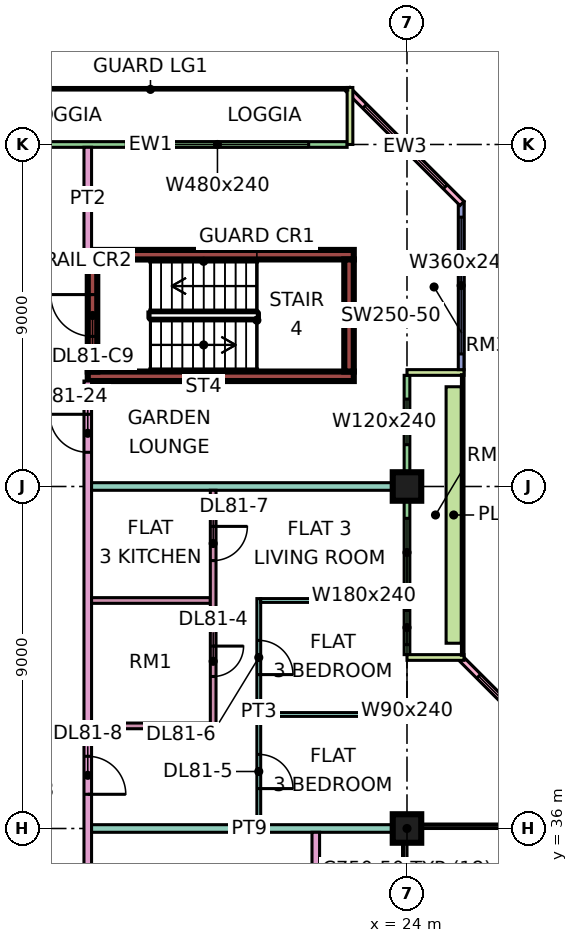
"""IFC4 building model, lengths in metres.
Left out: names, types, materials, properties, quantities, classifications, styles, units other than length and angle.
Written with IfcOpenShell. Run it as: python <this file> out.ifc"""

import sys

from ifc_helpers import new_model, si_unit, direction, frame, frame_2d, origin, origin_2d, place, context, subcontext, project, spatial, rectangle, extrude, element, fill, save


model = new_model("IFC4")
c1 = context("Model", 3, precision=1e-05, world=origin(), true_north=direction((0.0, 1.0)))
c2 = subcontext(c1, "Body", "Model", "MODEL_VIEW")
j1 = project(units=[si_unit("LENGTHUNIT", "METRE"), si_unit("PLANEANGLEUNIT", "RADIAN")], contexts=[c1])
p1 = place(None, origin())
s1 = spatial("IfcSite", under=j1, at=p1, CompositionType="ELEMENT")
p2 = place(p1, origin())
s2 = spatial("IfcBuilding", under=s1, at=p2, CompositionType="ELEMENT")
p3 = place(p2, frame((0.0, 0.0, 350.15)))
s3 = spatial("IfcBuildingStorey", under=s2, at=p3, CompositionType="ELEMENT", Elevation=350.15)
for number, where, z_axis, x_axis in (
    (1, (24.0, 36.0, 0.0), (0.0, 0.0, 1.0), (1.0, 0.0, 0.0)),
    (2, (24.0, 45.0, 0.0), (0.0, 0.0, 1.0), (1.0, 0.0, 0.0)),
):
    element("IfcColumn", number, at=place(p3, frame(where, z_axis=z_axis, x_axis=x_axis)), inside=s3, PredefinedType="COLUMN", context=c2, shape_type="SweptSolid", body=[
        extrude(rectangle(XDim=0.75, YDim=0.75, at=origin_2d()), origin(), (0.0, 0.0, 1.0), 3.75),
    ])
for number, where, z_axis, x_axis in (
    (3, (15.6, 47.9, 0.0), (0.0, 0.0, 1.0), (1.0, 0.0, 0.0)),
    (4, (15.6, 51.1, 0.0), (0.0, 0.0, 1.0), (1.0, 0.0, 0.0)),
):
    element("IfcWall", number, at=place(p3, frame(where, z_axis=z_axis, x_axis=x_axis)), inside=s3, PredefinedType="SHEAR", context=c2, shape_type="SweptSolid", body=[
        extrude(rectangle(XDim=7.0, YDim=0.25, at=frame_2d((3.5, 0.0))), origin(), (0.0, 0.0, 1.0), 3.75),
    ])
p4 = place(p3, frame((15.725, 48.025, 0.0), z_axis=(0.0, 0.0, 1.0), x_axis=(0.0, 1.0, 0.0)))
e5 = element("IfcWall", 5, at=p4, inside=s3, PredefinedType="SHEAR", context=c2, shape_type="SweptSolid", body=[
    extrude(rectangle(XDim=2.95, YDim=0.25, at=frame_2d((1.475, 0.0))), origin(), (0.0, 0.0, 1.0), 3.75),
])
p5 = place(p4, frame((0.925, 0.0, 0.0)))
e6 = element("IfcOpeningElement", 6, at=p5, cuts=e5, PredefinedType="OPENING", context=c2, shape_type="SweptSolid", body=[
    extrude(rectangle(XDim=1.1, YDim=2.2, at=frame_2d((0.55, 1.1))), frame((0.0, 0.135, 0.0), z_axis=(0.0, -1.0, 0.0), x_axis=(1.0, 0.0, 0.0)), (0.0, 0.0, 1.0), 0.27),
])
p6 = place(p3, frame((22.475, 48.025, 0.0), z_axis=(0.0, 0.0, 1.0), x_axis=(0.0, 1.0, 0.0)))
e7 = element("IfcWall", 7, at=p6, inside=s3, PredefinedType="SHEAR", context=c2, shape_type="SweptSolid", body=[
    extrude(rectangle(XDim=2.95, YDim=0.25, at=frame_2d((1.475, 0.0))), origin(), (0.0, 0.0, 1.0), 3.75),
])
p7 = place(p3, frame((28.447, 37.447, 0.0), z_axis=(0.0, 0.0, 1.0), x_axis=(-0.707106781187, 0.707106781187, 0.0)))
e8 = element("IfcWall", 8, at=p7, inside=s3, PredefinedType="SOLIDWALL", context=c2, shape_type="SweptSolid", body=[
    extrude(rectangle(XDim=4.243, YDim=0.15, at=frame_2d((2.121, 0.0))), origin(), (0.0, 0.0, 1.0), 3.35),
])
p8 = place(p7, frame((0.621, 0.0, 0.45)))
e9 = element("IfcOpeningElement", 9, at=p8, cuts=e8, PredefinedType="OPENING", context=c2, shape_type="SweptSolid", body=[
    extrude(rectangle(XDim=3.0, YDim=2.4, at=frame_2d((1.5, 1.2))), frame((0.0, 0.085, 0.0), z_axis=(0.0, -1.0, 0.0), x_axis=(1.0, 0.0, 0.0)), (0.0, 0.0, 1.0), 0.17),
])
p9 = place(p3, frame((24.0, 40.575, 0.0), z_axis=(0.0, 0.0, 1.0), x_axis=(0.0, 1.0, 0.0)))
e10 = element("IfcWall", 10, at=p9, inside=s3, PredefinedType="SOLIDWALL", context=c2, shape_type="SweptSolid", body=[
    extrude(rectangle(XDim=7.35, YDim=0.15, at=frame_2d((3.675, 0.0))), origin(), (0.0, 0.0, 1.0), 3.35),
])
p10 = place(p9, frame((0.262, 0.0, 0.45)))
e11 = element("IfcOpeningElement", 11, at=p10, cuts=e10, PredefinedType="OPENING", context=c2, shape_type="SweptSolid", body=[
    extrude(rectangle(XDim=0.9, YDim=2.4, at=frame_2d((0.45, 1.2))), frame((0.0, 0.085, 0.0), z_axis=(0.0, -1.0, 0.0), x_axis=(1.0, 0.0, 0.0)), (0.0, 0.0, 1.0), 0.17),
])
p11 = place(p9, frame((1.788, 0.0, 0.45)))
e12 = element("IfcOpeningElement", 12, at=p11, cuts=e10, PredefinedType="OPENING", context=c2, shape_type="SweptSolid", body=[
    extrude(rectangle(XDim=1.8, YDim=2.4, at=frame_2d((0.9, 1.2))), frame((0.0, 0.085, 0.0), z_axis=(0.0, -1.0, 0.0), x_axis=(1.0, 0.0, 0.0)), (0.0, 0.0, 1.0), 0.17),
])
p12 = place(p9, frame((5.525, 0.0, 0.45)))
e13 = element("IfcOpeningElement", 13, at=p12, cuts=e10, PredefinedType="OPENING", context=c2, shape_type="SweptSolid", body=[
    extrude(rectangle(XDim=1.2, YDim=2.4, at=frame_2d((0.6, 1.2))), frame((0.0, 0.085, 0.0), z_axis=(0.0, -1.0, 0.0), x_axis=(1.0, 0.0, 0.0)), (0.0, 0.0, 1.0), 0.17),
])
for number, where, z_axis, x_axis in (
    (14, (25.5, 40.5, 0.0), (0.0, 0.0, 1.0), (-1.0, 0.0, 0.0)),
    (15, (25.5, 48.0, 0.0), (0.0, 0.0, 1.0), (-1.0, 0.0, 0.0)),
):
    element("IfcWall", number, at=place(p3, frame(where, z_axis=z_axis, x_axis=x_axis)), inside=s3, PredefinedType="SOLIDWALL", context=c2, shape_type="SweptSolid", body=[
        extrude(rectangle(XDim=1.5, YDim=0.15, at=frame_2d((0.75, 0.0))), origin(), (0.0, 0.0, 1.0), 3.35),
    ])
p13 = place(p3, frame((25.425, 48.075, 0.0), z_axis=(0.0, 0.0, 1.0), x_axis=(0.0, 1.0, 0.0)))
e16 = element("IfcWall", 16, at=p13, inside=s3, PredefinedType="SOLIDWALL", context=c2, shape_type="SweptSolid", body=[
    extrude(rectangle(XDim=4.425, YDim=0.15, at=frame_2d((2.212, 0.0))), origin(), (0.0, 0.0, 1.0), 3.35),
])
p14 = place(p13, frame((0.413, 0.0, 0.45)))
e17 = element("IfcOpeningElement", 17, at=p14, cuts=e16, PredefinedType="OPENING", context=c2, shape_type="SweptSolid", body=[
    extrude(rectangle(XDim=3.6, YDim=2.4, at=frame_2d((1.8, 1.2))), frame((0.0, 0.085, 0.0), z_axis=(0.0, -1.0, 0.0), x_axis=(1.0, 0.0, 0.0)), (0.0, 0.0, 1.0), 0.17),
])
p15 = place(p3, frame((25.447, 52.447, 0.0), z_axis=(0.0, 0.0, 1.0), x_axis=(-0.707106781187, 0.707106781187, 0.0)))
e18 = element("IfcWall", 18, at=p15, inside=s3, PredefinedType="SOLIDWALL", context=c2, shape_type="SweptSolid", body=[
    extrude(rectangle(XDim=4.243, YDim=0.15, at=frame_2d((2.121, 0.0))), origin(), (0.0, 0.0, 1.0), 3.35),
])
p16 = place(p15, frame((0.621, 0.0, 0.45)))
e19 = element("IfcOpeningElement", 19, at=p16, cuts=e18, PredefinedType="OPENING", context=c2, shape_type="SweptSolid", body=[
    extrude(rectangle(XDim=3.0, YDim=2.4, at=frame_2d((1.5, 1.2))), frame((0.0, 0.085, 0.0), z_axis=(0.0, -1.0, 0.0), x_axis=(1.0, 0.0, 0.0)), (0.0, 0.0, 1.0), 0.17),
])
p17 = place(p3, frame((22.425, 54.0, 0.0), z_axis=(0.0, 0.0, 1.0), x_axis=(-1.0, 0.0, 0.0)))
e20 = element("IfcWall", 20, at=p17, inside=s3, PredefinedType="SOLIDWALL", context=c2, shape_type="SweptSolid", body=[
    extrude(rectangle(XDim=10.35, YDim=0.15, at=frame_2d((5.175, 0.0))), origin(), (0.0, 0.0, 1.0), 3.35),
])
p18 = place(p17, frame((1.012, 0.0, 0.45)))
e21 = element("IfcOpeningElement", 21, at=p18, cuts=e20, PredefinedType="OPENING", context=c2, shape_type="SweptSolid", body=[
    extrude(rectangle(XDim=4.8, YDim=2.4, at=frame_2d((2.4, 1.2))), frame((0.0, 0.085, 0.0), z_axis=(0.0, -1.0, 0.0), x_axis=(1.0, 0.0, 0.0)), (0.0, 0.0, 1.0), 0.17),
])
p19 = place(p3, frame((22.5, 55.5, 0.0), z_axis=(0.0, 0.0, 1.0), x_axis=(0.0, -1.0, 0.0)))
e22 = element("IfcWall", 22, at=p19, inside=s3, PredefinedType="SOLIDWALL", context=c2, shape_type="SweptSolid", body=[
    extrude(rectangle(XDim=1.5, YDim=0.15, at=frame_2d((0.75, 0.0))), origin(), (0.0, 0.0, 1.0), 3.35),
])
p20 = place(p3, frame((25.229, 40.875, 0.0), z_axis=(0.0, 0.0, 1.0), x_axis=(0.0, 1.0, 0.0)))
e23 = element("IfcWall", 23, at=p20, inside=s3, PredefinedType="SOLIDWALL", context=c2, shape_type="SweptSolid", body=[
    extrude(rectangle(XDim=6.75, YDim=0.4, at=frame_2d((3.375, 0.0))), origin(), (0.0, 0.0, 1.0), 0.7),
])
p21 = place(p3, frame((15.6, 20.0, 0.0), z_axis=(0.0, 0.0, 1.0), x_axis=(0.0, 1.0, 0.0)))
e24 = element("IfcWall", 24, at=p21, inside=s3, PredefinedType="PARTITIONING", context=c2, shape_type="SweptSolid", body=[
    extrude(rectangle(XDim=27.775, YDim=0.2, at=frame_2d((13.887, 0.0))), origin(), (0.0, 0.0, 1.0), 3.35),
])
p22 = place(p21, frame((6.7, 0.0, 0.0)))
e25 = element("IfcOpeningElement", 25, at=p22, cuts=e24, PredefinedType="OPENING", context=c2, shape_type="SweptSolid", body=[
    extrude(rectangle(XDim=1.6, YDim=2.1, at=frame_2d((0.8, 1.05))), frame((0.0, 0.11, 0.0), z_axis=(0.0, -1.0, 0.0), x_axis=(1.0, 0.0, 0.0)), (0.0, 0.0, 1.0), 0.22),
])
p23 = place(p21, frame((12.95, 0.0, 0.0)))
e26 = element("IfcOpeningElement", 26, at=p23, cuts=e24, PredefinedType="OPENING", context=c2, shape_type="SweptSolid", body=[
    extrude(rectangle(XDim=1.0, YDim=2.1, at=frame_2d((0.5, 1.05))), frame((0.0, 0.11, 0.0), z_axis=(0.0, -1.0, 0.0), x_axis=(1.0, 0.0, 0.0)), (0.0, 0.0, 1.0), 0.22),
])
p24 = place(p21, frame((16.9, 0.0, 0.0)))
e27 = element("IfcOpeningElement", 27, at=p24, cuts=e24, PredefinedType="OPENING", context=c2, shape_type="SweptSolid", body=[
    extrude(rectangle(XDim=1.0, YDim=2.1, at=frame_2d((0.5, 1.05))), frame((0.0, 0.11, 0.0), z_axis=(0.0, -1.0, 0.0), x_axis=(1.0, 0.0, 0.0)), (0.0, 0.0, 1.0), 0.22),
])
p25 = place(p21, frame((1.15, 0.0, 0.0)))
e28 = element("IfcOpeningElement", 28, at=p25, cuts=e24, PredefinedType="OPENING", context=c2, shape_type="SweptSolid", body=[
    extrude(rectangle(XDim=1.8, YDim=2.1, at=frame_2d((0.9, 1.05))), frame((0.0, 0.11, 0.0), z_axis=(0.0, -1.0, 0.0), x_axis=(1.0, 0.0, 0.0)), (0.0, 0.0, 1.0), 0.22),
])
p26 = place(p21, frame((25.9, 0.0, 0.0)))
e29 = element("IfcOpeningElement", 29, at=p26, cuts=e24, PredefinedType="OPENING", context=c2, shape_type="SweptSolid", body=[
    extrude(rectangle(XDim=1.0, YDim=2.1, at=frame_2d((0.5, 1.05))), frame((0.0, 0.11, 0.0), z_axis=(0.0, -1.0, 0.0), x_axis=(1.0, 0.0, 0.0)), (0.0, 0.0, 1.0), 0.22),
])
p27 = place(p3, frame((15.6, 51.225, 0.0), z_axis=(0.0, 0.0, 1.0), x_axis=(0.0, 1.0, 0.0)))
e30 = element("IfcWall", 30, at=p27, inside=s3, PredefinedType="PARTITIONING", context=c2, shape_type="SweptSolid", body=[
    extrude(rectangle(XDim=2.701, YDim=0.2, at=frame_2d((1.351, 0.0))), origin(), (0.0, 0.0, 1.0), 3.35),
])
p28 = place(p3, frame((15.7, 36.0, 0.0), z_axis=(0.0, 0.0, 1.0), x_axis=(1.0, 0.0, 0.0)))
e31 = element("IfcWall", 31, at=p28, inside=s3, PredefinedType="PARTITIONING", context=c2, shape_type="SweptSolid", body=[
    extrude(rectangle(XDim=8.3, YDim=0.2, at=frame_2d((4.15, 0.0))), origin(), (0.0, 0.0, 1.0), 3.35),
])
for number, where, z_axis, x_axis in (
    (32, (15.7, 38.7, 0.0), (0.0, 0.0, 1.0), (1.0, 0.0, 0.0)),
    (33, (15.7, 42.0, 0.0), (0.0, 0.0, 1.0), (1.0, 0.0, 0.0)),
):
    element("IfcWall", number, at=place(p3, frame(where, z_axis=z_axis, x_axis=x_axis)), inside=s3, PredefinedType="PARTITIONING", context=c2, shape_type="SweptSolid", body=[
        extrude(rectangle(XDim=3.125, YDim=0.15, at=frame_2d((1.562, 0.0))), origin(), (0.0, 0.0, 1.0), 3.35),
    ])
p29 = place(p3, frame((15.7, 45.0, 0.0), z_axis=(0.0, 0.0, 1.0), x_axis=(1.0, 0.0, 0.0)))
e34 = element("IfcWall", 34, at=p29, inside=s3, PredefinedType="PARTITIONING", context=c2, shape_type="SweptSolid", body=[
    extrude(rectangle(XDim=8.226, YDim=0.2, at=frame_2d((4.113, 0.0))), origin(), (0.0, 0.0, 1.0), 3.35),
])
p30 = place(p3, frame((18.9, 38.625, 0.0), z_axis=(0.0, 0.0, 1.0), x_axis=(0.0, 1.0, 0.0)))
e35 = element("IfcWall", 35, at=p30, inside=s3, PredefinedType="PARTITIONING", context=c2, shape_type="SweptSolid", body=[
    extrude(rectangle(XDim=6.275, YDim=0.15, at=frame_2d((3.137, 0.0))), origin(), (0.0, 0.0, 1.0), 3.35),
])
p31 = place(p30, frame((1.375, 0.0, 0.0)))
e36 = element("IfcOpeningElement", 36, at=p31, cuts=e35, PredefinedType="OPENING", context=c2, shape_type="SweptSolid", body=[
    extrude(rectangle(XDim=0.8, YDim=2.1, at=frame_2d((0.4, 1.05))), frame((0.0, 0.085, 0.0), z_axis=(0.0, -1.0, 0.0), x_axis=(1.0, 0.0, 0.0)), (0.0, 0.0, 1.0), 0.17),
])
p32 = place(p30, frame((4.425, 0.0, 0.0)))
e37 = element("IfcOpeningElement", 37, at=p32, cuts=e35, PredefinedType="OPENING", context=c2, shape_type="SweptSolid", body=[
    extrude(rectangle(XDim=0.9, YDim=2.1, at=frame_2d((0.45, 1.05))), frame((0.0, 0.085, 0.0), z_axis=(0.0, -1.0, 0.0), x_axis=(1.0, 0.0, 0.0)), (0.0, 0.0, 1.0), 0.17),
])
p33 = place(p3, frame((20.1, 36.1, 0.0), z_axis=(0.0, 0.0, 1.0), x_axis=(0.0, 1.0, 0.0)))
e38 = element("IfcWall", 38, at=p33, inside=s3, PredefinedType="PARTITIONING", context=c2, shape_type="SweptSolid", body=[
    extrude(rectangle(XDim=5.95, YDim=0.1, at=frame_2d((2.975, 0.0))), origin(), (0.0, 0.0, 1.0), 3.35),
])
p34 = place(p33, frame((0.95, 0.0, 0.0)))
e39 = element("IfcOpeningElement", 39, at=p34, cuts=e38, PredefinedType="OPENING", context=c2, shape_type="SweptSolid", body=[
    extrude(rectangle(XDim=0.9, YDim=2.1, at=frame_2d((0.45, 1.05))), frame((0.0, 0.06, 0.0), z_axis=(0.0, -1.0, 0.0), x_axis=(1.0, 0.0, 0.0)), (0.0, 0.0, 1.0), 0.12),
])
p35 = place(p33, frame((3.95, 0.0, 0.0)))
e40 = element("IfcOpeningElement", 40, at=p35, cuts=e38, PredefinedType="OPENING", context=c2, shape_type="SweptSolid", body=[
    extrude(rectangle(XDim=0.9, YDim=2.1, at=frame_2d((0.45, 1.05))), frame((0.0, 0.06, 0.0), z_axis=(0.0, -1.0, 0.0), x_axis=(1.0, 0.0, 0.0)), (0.0, 0.0, 1.0), 0.12),
])
p36 = place(p3, frame((20.15, 39.0, 0.0), z_axis=(0.0, 0.0, 1.0), x_axis=(1.0, 0.0, 0.0)))
e41 = element("IfcWall", 41, at=p36, inside=s3, PredefinedType="PARTITIONING", context=c2, shape_type="SweptSolid", body=[
    extrude(rectangle(XDim=3.85, YDim=0.1, at=frame_2d((1.925, 0.0))), origin(), (0.0, 0.0, 1.0), 3.35),
])
p37 = place(p3, frame((20.15, 42.0, 0.0), z_axis=(0.0, 0.0, 1.0), x_axis=(1.0, 0.0, 0.0)))
e42 = element("IfcWall", 42, at=p37, inside=s3, PredefinedType="PARTITIONING", context=c2, shape_type="SweptSolid", body=[
    extrude(rectangle(XDim=3.776, YDim=0.1, at=frame_2d((1.888, 0.0))), origin(), (0.0, 0.0, 1.0), 3.35),
])
p38 = place(p3, frame((21.6, 23.9, 0.0), z_axis=(0.0, 0.0, 1.0), x_axis=(0.0, 1.0, 0.0)))
e43 = element("IfcWall", 43, at=p38, inside=s3, PredefinedType="PARTITIONING", context=c2, shape_type="SweptSolid", body=[
    extrude(rectangle(XDim=12.0, YDim=0.2, at=frame_2d((6.0, 0.0))), origin(), (0.0, 0.0, 1.0), 3.35),
])
p39 = place(p8, origin())
e44 = element("IfcWindow", 44, at=p39, inside=s3, PartitioningType="SINGLE_PANEL", PredefinedType="WINDOW", context=c2, shape_type="SweptSolid", body=[
    extrude(rectangle(XDim=3.0, YDim=2.4, at=frame_2d((1.5, 1.2))), frame((0.0, 0.03, 0.0), z_axis=(0.0, -1.0, 0.0), x_axis=(1.0, 0.0, 0.0)), (0.0, 0.0, 1.0), 0.06),
])
fill(e9, e44)
p40 = place(p10, origin())
e45 = element("IfcWindow", 45, at=p40, inside=s3, PartitioningType="SINGLE_PANEL", PredefinedType="WINDOW", context=c2, shape_type="SweptSolid", body=[
    extrude(rectangle(XDim=0.9, YDim=2.4, at=frame_2d((0.45, 1.2))), frame((0.0, 0.03, 0.0), z_axis=(0.0, -1.0, 0.0), x_axis=(1.0, 0.0, 0.0)), (0.0, 0.0, 1.0), 0.06),
])
fill(e11, e45)
p41 = place(p11, origin())
e46 = element("IfcWindow", 46, at=p41, inside=s3, PartitioningType="SINGLE_PANEL", PredefinedType="WINDOW", context=c2, shape_type="SweptSolid", body=[
    extrude(rectangle(XDim=1.8, YDim=2.4, at=frame_2d((0.9, 1.2))), frame((0.0, 0.03, 0.0), z_axis=(0.0, -1.0, 0.0), x_axis=(1.0, 0.0, 0.0)), (0.0, 0.0, 1.0), 0.06),
])
fill(e12, e46)
p42 = place(p12, origin())
e47 = element("IfcWindow", 47, at=p42, inside=s3, PartitioningType="SINGLE_PANEL", PredefinedType="WINDOW", context=c2, shape_type="SweptSolid", body=[
    extrude(rectangle(XDim=1.2, YDim=2.4, at=frame_2d((0.6, 1.2))), frame((0.0, 0.03, 0.0), z_axis=(0.0, -1.0, 0.0), x_axis=(1.0, 0.0, 0.0)), (0.0, 0.0, 1.0), 0.06),
])
fill(e13, e47)
p43 = place(p14, origin())
e48 = element("IfcWindow", 48, at=p43, inside=s3, PartitioningType="SINGLE_PANEL", PredefinedType="WINDOW", context=c2, shape_type="SweptSolid", body=[
    extrude(rectangle(XDim=3.6, YDim=2.4, at=frame_2d((1.8, 1.2))), frame((0.0, 0.03, 0.0), z_axis=(0.0, -1.0, 0.0), x_axis=(1.0, 0.0, 0.0)), (0.0, 0.0, 1.0), 0.06),
])
fill(e17, e48)
p44 = place(p16, origin())
e49 = element("IfcWindow", 49, at=p44, inside=s3, PartitioningType="SINGLE_PANEL", PredefinedType="WINDOW", context=c2, shape_type="SweptSolid", body=[
    extrude(rectangle(XDim=3.0, YDim=2.4, at=frame_2d((1.5, 1.2))), frame((0.0, 0.03, 0.0), z_axis=(0.0, -1.0, 0.0), x_axis=(1.0, 0.0, 0.0)), (0.0, 0.0, 1.0), 0.06),
])
fill(e19, e49)
p45 = place(p18, origin())
e50 = element("IfcWindow", 50, at=p45, inside=s3, PartitioningType="SINGLE_PANEL", PredefinedType="WINDOW", context=c2, shape_type="SweptSolid", body=[
    extrude(rectangle(XDim=4.8, YDim=2.4, at=frame_2d((2.4, 1.2))), frame((0.0, 0.03, 0.0), z_axis=(0.0, -1.0, 0.0), x_axis=(1.0, 0.0, 0.0)), (0.0, 0.0, 1.0), 0.06),
])
fill(e21, e50)
p46 = place(p5, frame((1.1, 0.0, 0.0), z_axis=(0.0, 0.0, 1.0), x_axis=(-1.0, 0.0, 0.0)))
e51 = element("IfcDoor", 51, at=p46, inside=s3, OperationType="SINGLE_SWING_RIGHT", PredefinedType="DOOR", context=c2, shape_type="SweptSolid", body=[
    extrude(rectangle(XDim=1.1, YDim=2.2, at=frame_2d((0.55, 1.1))), frame((0.0, 0.025, 0.0), z_axis=(0.0, -1.0, 0.0), x_axis=(1.0, 0.0, 0.0)), (0.0, 0.0, 1.0), 0.05),
])
fill(e6, e51)
p47 = place(p31, origin())
e52 = element("IfcDoor", 52, at=p47, inside=s3, OperationType="SINGLE_SWING_RIGHT", PredefinedType="DOOR", context=c2, shape_type="SweptSolid", body=[
    extrude(rectangle(XDim=0.8, YDim=2.1, at=frame_2d((0.4, 1.05))), frame((0.0, 0.025, 0.0), z_axis=(0.0, -1.0, 0.0), x_axis=(1.0, 0.0, 0.0)), (0.0, 0.0, 1.0), 0.05),
])
fill(e36, e52)
p48 = place(p34, frame((0.9, 0.0, 0.0), z_axis=(0.0, 0.0, 1.0), x_axis=(-1.0, 0.0, 0.0)))
e53 = element("IfcDoor", 53, at=p48, inside=s3, OperationType="SINGLE_SWING_LEFT", PredefinedType="DOOR", context=c2, shape_type="SweptSolid", body=[
    extrude(rectangle(XDim=0.9, YDim=2.1, at=frame_2d((0.45, 1.05))), frame((0.0, 0.025, 0.0), z_axis=(0.0, -1.0, 0.0), x_axis=(1.0, 0.0, 0.0)), (0.0, 0.0, 1.0), 0.05),
])
fill(e39, e53)
p49 = place(p35, frame((0.9, 0.0, 0.0), z_axis=(0.0, 0.0, 1.0), x_axis=(-1.0, 0.0, 0.0)))
e54 = element("IfcDoor", 54, at=p49, inside=s3, OperationType="SINGLE_SWING_LEFT", PredefinedType="DOOR", context=c2, shape_type="SweptSolid", body=[
    extrude(rectangle(XDim=0.9, YDim=2.1, at=frame_2d((0.45, 1.05))), frame((0.0, 0.025, 0.0), z_axis=(0.0, -1.0, 0.0), x_axis=(1.0, 0.0, 0.0)), (0.0, 0.0, 1.0), 0.05),
])
fill(e40, e54)
p50 = place(p32, origin())
e55 = element("IfcDoor", 55, at=p50, inside=s3, OperationType="SINGLE_SWING_RIGHT", PredefinedType="DOOR", context=c2, shape_type="SweptSolid", body=[
    extrude(rectangle(XDim=0.9, YDim=2.1, at=frame_2d((0.45, 1.05))), frame((0.0, 0.025, 0.0), z_axis=(0.0, -1.0, 0.0), x_axis=(1.0, 0.0, 0.0)), (0.0, 0.0, 1.0), 0.05),
])
fill(e37, e55)
p51 = place(p24, frame((1.0, 0.0, 0.0), z_axis=(0.0, 0.0, 1.0), x_axis=(-1.0, 0.0, 0.0)))
e56 = element("IfcDoor", 56, at=p51, inside=s3, OperationType="SINGLE_SWING_LEFT", PredefinedType="DOOR", context=c2, shape_type="SweptSolid", body=[
    extrude(rectangle(XDim=1.0, YDim=2.1, at=frame_2d((0.5, 1.05))), frame((0.0, 0.025, 0.0), z_axis=(0.0, -1.0, 0.0), x_axis=(1.0, 0.0, 0.0)), (0.0, 0.0, 1.0), 0.05),
])
fill(e27, e56)
p52 = place(p26, frame((1.0, 0.0, 0.0), z_axis=(0.0, 0.0, 1.0), x_axis=(-1.0, 0.0, 0.0)))
e57 = element("IfcDoor", 57, at=p52, inside=s3, OperationType="SINGLE_SWING_RIGHT", PredefinedType="DOOR", context=c2, shape_type="SweptSolid", body=[
    extrude(rectangle(XDim=1.0, YDim=2.1, at=frame_2d((0.5, 1.05))), frame((0.0, 0.025, 0.0), z_axis=(0.0, -1.0, 0.0), x_axis=(1.0, 0.0, 0.0)), (0.0, 0.0, 1.0), 0.05),
])
fill(e29, e57)
save(model, sys.argv[1])
